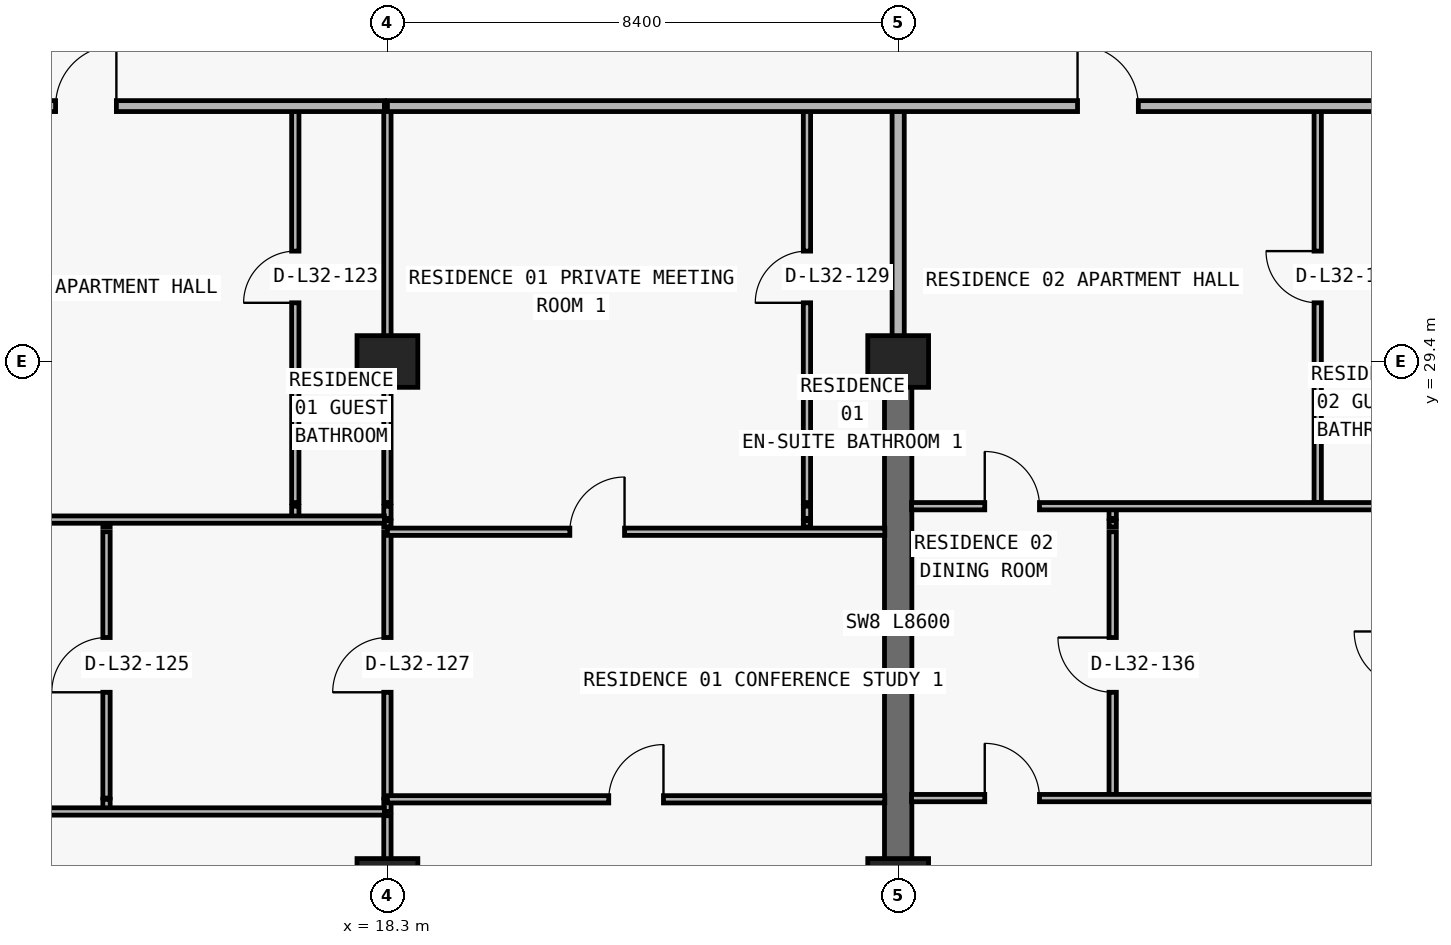
"""IFC4 building model, lengths in metres.
Left out: names, types, materials, properties, quantities, classifications, styles, units other than length and angle.
Written with IfcOpenShell. Run it as: python <this file> out.ifc"""

import sys

from ifc_helpers import new_model, si_unit, direction, frame, frame_2d, origin, origin_2d, place, context, subcontext, project, spatial, rectangle, extrude, element, fill, save


model = new_model("IFC4")
c1 = context("Model", 3, precision=1e-05, world=origin(), true_north=direction((0.0, 1.0)))
c2 = subcontext(c1, "Body", "Model", "MODEL_VIEW")
j1 = project(units=[si_unit("LENGTHUNIT", "METRE"), si_unit("PLANEANGLEUNIT", "RADIAN")], contexts=[c1])
p1 = place(None, origin())
s1 = spatial("IfcSite", under=j1, at=p1, CompositionType="ELEMENT")
p2 = place(p1, origin())
s2 = spatial("IfcBuilding", under=s1, at=p2, CompositionType="ELEMENT")
p3 = place(p2, frame((0.0, 0.0, 119.1)))
s3 = spatial("IfcBuildingStorey", under=s2, at=p3, CompositionType="ELEMENT", Elevation=119.1)
for number, where, z_axis, x_axis in (
    (1, (18.3, 20.8, 0.0), (0.0, 0.0, 1.0), (1.0, 0.0, 0.0)),
    (2, (26.7, 20.8, 0.0), (0.0, 0.0, 1.0), (1.0, 0.0, 0.0)),
    (3, (18.3, 29.4, 0.0), (0.0, 0.0, 1.0), (1.0, 0.0, 0.0)),
    (4, (26.7, 29.4, 0.0), (0.0, 0.0, 1.0), (1.0, 0.0, 0.0)),
):
    element("IfcColumn", number, at=place(p3, frame(where, z_axis=z_axis, x_axis=x_axis)), inside=s3, PredefinedType="COLUMN", context=c2, shape_type="SweptSolid", body=[
        extrude(rectangle(XDim=1.0, YDim=0.85, at=origin_2d()), origin(), (0.0, 0.0, 1.0), 3.05),
    ])
p4 = place(p3, frame((26.7, 20.8, 0.0), z_axis=(0.0, 0.0, 1.0), x_axis=(0.0, 1.0, 0.0)))
e5 = element("IfcWall", 5, at=p4, inside=s3, PredefinedType="SHEAR", context=c2, shape_type="SweptSolid", body=[
    extrude(rectangle(XDim=8.6, YDim=0.45, at=frame_2d((4.3, 0.0))), origin(), (0.0, 0.0, 1.0), 3.05),
])
p5 = place(p3, frame((13.68, 22.0, 0.0), z_axis=(0.0, 0.0, 1.0), x_axis=(0.0, 1.0, 0.0)))
e6 = element("IfcWall", 6, at=p5, inside=s3, PredefinedType="PARTITIONING", context=c2, shape_type="SweptSolid", body=[
    extrude(rectangle(XDim=0.2, YDim=0.12, at=frame_2d((0.1, 0.0))), origin(), (0.0, 0.0, 1.0), 3.05),
])
p6 = place(p3, frame((13.68, 22.22, 0.0), z_axis=(0.0, 0.0, 1.0), x_axis=(0.0, 1.0, 0.0)))
e7 = element("IfcWall", 7, at=p6, inside=s3, PredefinedType="PARTITIONING", context=c2, shape_type="SweptSolid", body=[
    extrude(rectangle(XDim=4.38, YDim=0.12, at=frame_2d((2.19, 0.0))), origin(), (0.0, 0.0, 1.0), 3.05),
])
p7 = place(p6, frame((1.74, 0.0, 0.0)))
e8 = element("IfcOpeningElement", 8, at=p7, cuts=e7, PredefinedType="OPENING", context=c2, shape_type="SweptSolid", body=[
    extrude(rectangle(XDim=0.9, YDim=2.15, at=frame_2d((0.45, 1.075))), frame((0.0, 0.07, 0.0), z_axis=(0.0, -1.0, 0.0), x_axis=(1.0, 0.0, 0.0)), (0.0, 0.0, 1.0), 0.14),
])
p8 = place(p3, frame((13.68, 26.68, 0.0), z_axis=(0.0, 0.0, 1.0), x_axis=(0.0, 1.0, 0.0)))
e9 = element("IfcWall", 9, at=p8, inside=s3, PredefinedType="PARTITIONING", context=c2, shape_type="SweptSolid", body=[
    extrude(rectangle(XDim=0.1, YDim=0.12, at=frame_2d((0.05, 0.0))), origin(), (0.0, 0.0, 1.0), 3.05),
])
p9 = place(p3, frame((16.785, 26.82, 0.0), z_axis=(0.0, 0.0, 1.0), x_axis=(0.0, 1.0, 0.0)))
e10 = element("IfcWall", 10, at=p9, inside=s3, PredefinedType="PARTITIONING", context=c2, shape_type="SweptSolid", body=[
    extrude(rectangle(XDim=0.2, YDim=0.12, at=frame_2d((0.1, 0.0))), origin(), (0.0, 0.0, 1.0), 3.05),
])
p10 = place(p3, frame((16.785, 27.08, 0.0), z_axis=(0.0, 0.0, 1.0), x_axis=(0.0, 1.0, 0.0)))
e11 = element("IfcWall", 11, at=p10, inside=s3, PredefinedType="PARTITIONING", context=c2, shape_type="SweptSolid", body=[
    extrude(rectangle(XDim=6.52, YDim=0.12, at=frame_2d((3.26, 0.0))), origin(), (0.0, 0.0, 1.0), 3.05),
])
p11 = place(p10, frame((3.285, 0.0, 0.0)))
e12 = element("IfcOpeningElement", 12, at=p11, cuts=e11, PredefinedType="OPENING", context=c2, shape_type="SweptSolid", body=[
    extrude(rectangle(XDim=0.85, YDim=2.1, at=frame_2d((0.425, 1.05))), frame((0.0, 0.07, 0.0), z_axis=(0.0, -1.0, 0.0), x_axis=(1.0, 0.0, 0.0)), (0.0, 0.0, 1.0), 0.14),
])
p12 = place(p3, frame((18.3, 8.84, 0.0), z_axis=(0.0, 0.0, 1.0), x_axis=(0.0, 1.0, 0.0)))
e13 = element("IfcWall", 13, at=p12, inside=s3, PredefinedType="PARTITIONING", context=c2, shape_type="SweptSolid", body=[
    extrude(rectangle(XDim=13.09, YDim=0.12, at=frame_2d((6.545, 0.0))), origin(), (0.0, 0.0, 1.0), 2.174),
])
p13 = place(p3, frame((18.3, 22.0, 0.0), z_axis=(0.0, 0.0, 1.0), x_axis=(0.0, 1.0, 0.0)))
e14 = element("IfcWall", 14, at=p13, inside=s3, PredefinedType="PARTITIONING", context=c2, shape_type="SweptSolid", body=[
    extrude(rectangle(XDim=0.2, YDim=0.12, at=frame_2d((0.1, 0.0))), origin(), (0.0, 0.0, 1.0), 2.174),
])
p14 = place(p3, frame((18.3, 22.22, 0.0), z_axis=(0.0, 0.0, 1.0), x_axis=(0.0, 1.0, 0.0)))
e15 = element("IfcWall", 15, at=p14, inside=s3, PredefinedType="PARTITIONING", context=c2, shape_type="SweptSolid", body=[
    extrude(rectangle(XDim=4.38, YDim=0.12, at=frame_2d((2.19, 0.0))), origin(), (0.0, 0.0, 1.0), 2.174),
])
p15 = place(p14, frame((1.74, 0.0, 0.0)))
e16 = element("IfcOpeningElement", 16, at=p15, cuts=e15, PredefinedType="OPENING", context=c2, shape_type="SweptSolid", body=[
    extrude(rectangle(XDim=0.9, YDim=2.124, at=frame_2d((0.45, 1.062))), frame((0.0, 0.07, 0.0), z_axis=(0.0, -1.0, 0.0), x_axis=(1.0, 0.0, 0.0)), (0.0, 0.0, 1.0), 0.14),
])
p16 = place(p3, frame((18.3, 26.68, 0.0), z_axis=(0.0, 0.0, 1.0), x_axis=(0.0, 1.0, 0.0)))
e17 = element("IfcWall", 17, at=p16, inside=s3, PredefinedType="PARTITIONING", context=c2, shape_type="SweptSolid", body=[
    extrude(rectangle(XDim=0.1, YDim=0.12, at=frame_2d((0.05, 0.0))), origin(), (0.0, 0.0, 1.0), 2.174),
])
p17 = place(p3, frame((18.3, 26.82, 0.0), z_axis=(0.0, 0.0, 1.0), x_axis=(0.0, 1.0, 0.0)))
e18 = element("IfcWall", 18, at=p17, inside=s3, PredefinedType="PARTITIONING", context=c2, shape_type="SweptSolid", body=[
    extrude(rectangle(XDim=0.2, YDim=0.12, at=frame_2d((0.1, 0.0))), origin(), (0.0, 0.0, 1.0), 2.174),
])
p18 = place(p3, frame((18.3, 27.08, 0.0), z_axis=(0.0, 0.0, 1.0), x_axis=(0.0, 1.0, 0.0)))
e19 = element("IfcWall", 19, at=p18, inside=s3, PredefinedType="PARTITIONING", context=c2, shape_type="SweptSolid", body=[
    extrude(rectangle(XDim=6.52, YDim=0.12, at=frame_2d((3.26, 0.0))), origin(), (0.0, 0.0, 1.0), 2.174),
])
p19 = place(p3, frame((25.2, 26.68, 0.0), z_axis=(0.0, 0.0, 1.0), x_axis=(0.0, 1.0, 0.0)))
e20 = element("IfcWall", 20, at=p19, inside=s3, PredefinedType="PARTITIONING", context=c2, shape_type="SweptSolid", body=[
    extrude(rectangle(XDim=0.1, YDim=0.12, at=frame_2d((0.05, 0.0))), origin(), (0.0, 0.0, 1.0), 3.05),
])
p20 = place(p3, frame((25.2, 26.82, 0.0), z_axis=(0.0, 0.0, 1.0), x_axis=(0.0, 1.0, 0.0)))
e21 = element("IfcWall", 21, at=p20, inside=s3, PredefinedType="PARTITIONING", context=c2, shape_type="SweptSolid", body=[
    extrude(rectangle(XDim=0.2, YDim=0.12, at=frame_2d((0.1, 0.0))), origin(), (0.0, 0.0, 1.0), 3.05),
])
p21 = place(p3, frame((25.2, 27.08, 0.0), z_axis=(0.0, 0.0, 1.0), x_axis=(0.0, 1.0, 0.0)))
e22 = element("IfcWall", 22, at=p21, inside=s3, PredefinedType="PARTITIONING", context=c2, shape_type="SweptSolid", body=[
    extrude(rectangle(XDim=6.52, YDim=0.12, at=frame_2d((3.26, 0.0))), origin(), (0.0, 0.0, 1.0), 3.05),
])
p22 = place(p21, frame((3.285, 0.0, 0.0)))
e23 = element("IfcOpeningElement", 23, at=p22, cuts=e22, PredefinedType="OPENING", context=c2, shape_type="SweptSolid", body=[
    extrude(rectangle(XDim=0.85, YDim=2.1, at=frame_2d((0.425, 1.05))), frame((0.0, 0.07, 0.0), z_axis=(0.0, -1.0, 0.0), x_axis=(1.0, 0.0, 0.0)), (0.0, 0.0, 1.0), 0.14),
])
p23 = place(p3, frame((26.7, 29.405, 0.0), z_axis=(0.0, 0.0, 1.0), x_axis=(0.0, 1.0, 0.0)))
e24 = element("IfcWall", 24, at=p23, inside=s3, PredefinedType="PARTITIONING", context=c2, shape_type="SweptSolid", body=[
    extrude(rectangle(XDim=4.195, YDim=0.2, at=frame_2d((2.098, 0.0))), origin(), (0.0, 0.0, 1.0), 2.335),
])
p24 = place(p3, frame((30.228, 22.22, 0.0), z_axis=(0.0, 0.0, 1.0), x_axis=(0.0, 1.0, 0.0)))
e25 = element("IfcWall", 25, at=p24, inside=s3, PredefinedType="PARTITIONING", context=c2, shape_type="SweptSolid", body=[
    extrude(rectangle(XDim=4.38, YDim=0.12, at=frame_2d((2.19, 0.0))), origin(), (0.0, 0.0, 1.0), 3.05),
])
p25 = place(p24, frame((1.74, 0.0, 0.0)))
e26 = element("IfcOpeningElement", 26, at=p25, cuts=e25, PredefinedType="OPENING", context=c2, shape_type="SweptSolid", body=[
    extrude(rectangle(XDim=0.9, YDim=2.15, at=frame_2d((0.45, 1.075))), frame((0.0, 0.07, 0.0), z_axis=(0.0, -1.0, 0.0), x_axis=(1.0, 0.0, 0.0)), (0.0, 0.0, 1.0), 0.14),
])
p26 = place(p3, frame((30.228, 26.68, 0.0), z_axis=(0.0, 0.0, 1.0), x_axis=(0.0, 1.0, 0.0)))
e27 = element("IfcWall", 27, at=p26, inside=s3, PredefinedType="PARTITIONING", context=c2, shape_type="SweptSolid", body=[
    extrude(rectangle(XDim=0.1, YDim=0.12, at=frame_2d((0.05, 0.0))), origin(), (0.0, 0.0, 1.0), 3.05),
])
p27 = place(p3, frame((30.228, 26.82, 0.0), z_axis=(0.0, 0.0, 1.0), x_axis=(0.0, 1.0, 0.0)))
e28 = element("IfcWall", 28, at=p27, inside=s3, PredefinedType="PARTITIONING", context=c2, shape_type="SweptSolid", body=[
    extrude(rectangle(XDim=0.2, YDim=0.12, at=frame_2d((0.1, 0.0))), origin(), (0.0, 0.0, 1.0), 3.05),
])
p28 = place(p3, frame((33.6, 27.08, 0.0), z_axis=(0.0, 0.0, 1.0), x_axis=(0.0, 1.0, 0.0)))
e29 = element("IfcWall", 29, at=p28, inside=s3, PredefinedType="PARTITIONING", context=c2, shape_type="SweptSolid", body=[
    extrude(rectangle(XDim=6.52, YDim=0.12, at=frame_2d((3.26, 0.0))), origin(), (0.0, 0.0, 1.0), 3.05),
])
p29 = place(p28, frame((3.285, 0.0, 0.0)))
e30 = element("IfcOpeningElement", 30, at=p29, cuts=e29, PredefinedType="OPENING", context=c2, shape_type="SweptSolid", body=[
    extrude(rectangle(XDim=0.85, YDim=2.1, at=frame_2d((0.425, 1.05))), frame((0.0, 0.07, 0.0), z_axis=(0.0, -1.0, 0.0), x_axis=(1.0, 0.0, 0.0)), (0.0, 0.0, 1.0), 0.14),
])
p30 = place(p3, frame((9.9, 22.0, 0.0), z_axis=(0.0, 0.0, 1.0), x_axis=(1.0, 0.0, 0.0)))
e31 = element("IfcWall", 31, at=p30, inside=s3, PredefinedType="PARTITIONING", context=c2, shape_type="SweptSolid", body=[
    extrude(rectangle(XDim=8.35, YDim=0.12, at=frame_2d((4.175, 0.0))), origin(), (0.0, 0.0, 1.0), 3.05),
])
p31 = place(p30, frame((1.44, 0.0, 0.0)))
e32 = element("IfcOpeningElement", 32, at=p31, cuts=e31, PredefinedType="OPENING", context=c2, shape_type="SweptSolid", body=[
    extrude(rectangle(XDim=0.9, YDim=2.15, at=frame_2d((0.45, 1.075))), frame((0.0, 0.07, 0.0), z_axis=(0.0, -1.0, 0.0), x_axis=(1.0, 0.0, 0.0)), (0.0, 0.0, 1.0), 0.14),
])
p32 = place(p3, frame((18.3, 22.2, 0.0), z_axis=(0.0, 0.0, 1.0), x_axis=(1.0, 0.0, 0.0)))
e33 = element("IfcWall", 33, at=p32, inside=s3, PredefinedType="PARTITIONING", context=c2, shape_type="SweptSolid", body=[
    extrude(rectangle(XDim=8.18, YDim=0.12, at=frame_2d((4.09, 0.0))), origin(), (0.0, 0.0, 1.0), 3.05),
])
p33 = place(p32, frame((3.64, 0.0, 0.0)))
e34 = element("IfcOpeningElement", 34, at=p33, cuts=e33, PredefinedType="OPENING", context=c2, shape_type="SweptSolid", body=[
    extrude(rectangle(XDim=0.9, YDim=2.15, at=frame_2d((0.45, 1.075))), frame((0.0, 0.07, 0.0), z_axis=(0.0, -1.0, 0.0), x_axis=(1.0, 0.0, 0.0)), (0.0, 0.0, 1.0), 0.14),
])
p34 = place(p3, frame((26.92, 22.22, 0.0), z_axis=(0.0, 0.0, 1.0), x_axis=(1.0, 0.0, 0.0)))
e35 = element("IfcWall", 35, at=p34, inside=s3, PredefinedType="PARTITIONING", context=c2, shape_type="SweptSolid", body=[
    extrude(rectangle(XDim=8.18, YDim=0.12, at=frame_2d((4.09, 0.0))), origin(), (0.0, 0.0, 1.0), 3.05),
])
p35 = place(p34, frame((1.204, 0.0, 0.0)))
e36 = element("IfcOpeningElement", 36, at=p35, cuts=e35, PredefinedType="OPENING", context=c2, shape_type="SweptSolid", body=[
    extrude(rectangle(XDim=0.9, YDim=2.15, at=frame_2d((0.45, 1.075))), frame((0.0, 0.07, 0.0), z_axis=(0.0, -1.0, 0.0), x_axis=(1.0, 0.0, 0.0)), (0.0, 0.0, 1.0), 0.14),
])
p36 = place(p3, frame((18.3, 26.6, 0.0), z_axis=(0.0, 0.0, 1.0), x_axis=(1.0, 0.0, 0.0)))
e37 = element("IfcWall", 37, at=p36, inside=s3, PredefinedType="PARTITIONING", context=c2, shape_type="SweptSolid", body=[
    extrude(rectangle(XDim=8.18, YDim=0.12, at=frame_2d((4.09, 0.0))), origin(), (0.0, 0.0, 1.0), 3.05),
])
p37 = place(p36, frame((3.0, 0.0, 0.0)))
e38 = element("IfcOpeningElement", 38, at=p37, cuts=e37, PredefinedType="OPENING", context=c2, shape_type="SweptSolid", body=[
    extrude(rectangle(XDim=0.9, YDim=2.15, at=frame_2d((0.45, 1.075))), frame((0.0, 0.07, 0.0), z_axis=(0.0, -1.0, 0.0), x_axis=(1.0, 0.0, 0.0)), (0.0, 0.0, 1.0), 0.14),
])
p38 = place(p3, frame((9.9, 26.8, 0.0), z_axis=(0.0, 0.0, 1.0), x_axis=(1.0, 0.0, 0.0)))
e39 = element("IfcWall", 39, at=p38, inside=s3, PredefinedType="PARTITIONING", context=c2, shape_type="SweptSolid", body=[
    extrude(rectangle(XDim=8.35, YDim=0.12, at=frame_2d((4.175, 0.0))), origin(), (0.0, 0.0, 1.0), 3.05),
])
p39 = place(p38, frame((1.44, 0.0, 0.0)))
e40 = element("IfcOpeningElement", 40, at=p39, cuts=e39, PredefinedType="OPENING", context=c2, shape_type="SweptSolid", body=[
    extrude(rectangle(XDim=0.9, YDim=2.15, at=frame_2d((0.45, 1.075))), frame((0.0, 0.07, 0.0), z_axis=(0.0, -1.0, 0.0), x_axis=(1.0, 0.0, 0.0)), (0.0, 0.0, 1.0), 0.14),
])
p40 = place(p3, frame((26.92, 27.02, 0.0), z_axis=(0.0, 0.0, 1.0), x_axis=(1.0, 0.0, 0.0)))
e41 = element("IfcWall", 41, at=p40, inside=s3, PredefinedType="PARTITIONING", context=c2, shape_type="SweptSolid", body=[
    extrude(rectangle(XDim=8.175, YDim=0.12, at=frame_2d((4.087, 0.0))), origin(), (0.0, 0.0, 1.0), 3.05),
])
p41 = place(p40, frame((1.204, 0.0, 0.0)))
e42 = element("IfcOpeningElement", 42, at=p41, cuts=e41, PredefinedType="OPENING", context=c2, shape_type="SweptSolid", body=[
    extrude(rectangle(XDim=0.9, YDim=2.15, at=frame_2d((0.45, 1.075))), frame((0.0, 0.07, 0.0), z_axis=(0.0, -1.0, 0.0), x_axis=(1.0, 0.0, 0.0)), (0.0, 0.0, 1.0), 0.14),
])
p42 = place(p3, frame((7.705, 33.6, 0.0), z_axis=(0.0, 0.0, 1.0), x_axis=(1.0, 0.0, 0.0)))
e43 = element("IfcWall", 43, at=p42, inside=s3, PredefinedType="PARTITIONING", context=c2, shape_type="SweptSolid", body=[
    extrude(rectangle(XDim=10.545, YDim=0.18, at=frame_2d((5.272, 0.0))), origin(), (0.0, 0.0, 1.0), 3.05),
])
p43 = place(p42, frame((5.137, 0.0, 0.0)))
e44 = element("IfcOpeningElement", 44, at=p43, cuts=e43, PredefinedType="OPENING", context=c2, shape_type="SweptSolid", body=[
    extrude(rectangle(XDim=1.0, YDim=2.2, at=frame_2d((0.5, 1.1))), frame((0.0, 0.1, 0.0), z_axis=(0.0, -1.0, 0.0), x_axis=(1.0, 0.0, 0.0)), (0.0, 0.0, 1.0), 0.2),
])
p44 = place(p3, frame((18.3, 33.6, 0.0), z_axis=(0.0, 0.0, 1.0), x_axis=(1.0, 0.0, 0.0)))
e45 = element("IfcWall", 45, at=p44, inside=s3, PredefinedType="PARTITIONING", context=c2, shape_type="SweptSolid", body=[
    extrude(rectangle(XDim=41.2, YDim=0.18, at=frame_2d((20.6, 0.0))), origin(), (0.0, 0.0, 1.0), 3.05),
])
p45 = place(p44, frame((11.35, 0.0, 0.0)))
e46 = element("IfcOpeningElement", 46, at=p45, cuts=e45, PredefinedType="OPENING", context=c2, shape_type="SweptSolid", body=[
    extrude(rectangle(XDim=1.0, YDim=2.2, at=frame_2d((0.5, 1.1))), frame((0.0, 0.1, 0.0), z_axis=(0.0, -1.0, 0.0), x_axis=(1.0, 0.0, 0.0)), (0.0, 0.0, 1.0), 0.2),
])
p46 = place(p44, frame((27.275, 0.0, 0.0)))
e47 = element("IfcOpeningElement", 47, at=p46, cuts=e45, PredefinedType="OPENING", context=c2, shape_type="SweptSolid", body=[
    extrude(rectangle(XDim=1.0, YDim=2.2, at=frame_2d((0.5, 1.1))), frame((0.0, 0.1, 0.0), z_axis=(0.0, -1.0, 0.0), x_axis=(1.0, 0.0, 0.0)), (0.0, 0.0, 1.0), 0.2),
])
p47 = place(p44, frame((35.675, 0.0, 0.0)))
e48 = element("IfcOpeningElement", 48, at=p47, cuts=e45, PredefinedType="OPENING", context=c2, shape_type="SweptSolid", body=[
    extrude(rectangle(XDim=1.0, YDim=2.2, at=frame_2d((0.5, 1.1))), frame((0.0, 0.1, 0.0), z_axis=(0.0, -1.0, 0.0), x_axis=(1.0, 0.0, 0.0)), (0.0, 0.0, 1.0), 0.2),
])
p48 = place(p43, origin())
e49 = element("IfcDoor", 49, at=p48, inside=s3, OperationType="SINGLE_SWING_RIGHT", PredefinedType="DOOR", context=c2, shape_type="SweptSolid", body=[
    extrude(rectangle(XDim=1.0, YDim=2.2, at=frame_2d((0.5, 1.1))), frame((0.0, 0.025, 0.0), z_axis=(0.0, -1.0, 0.0), x_axis=(1.0, 0.0, 0.0)), (0.0, 0.0, 1.0), 0.05),
])
fill(e44, e49)
p49 = place(p11, origin())
e50 = element("IfcDoor", 50, at=p49, inside=s3, OperationType="SINGLE_SWING_LEFT", PredefinedType="DOOR", context=c2, shape_type="SweptSolid", body=[
    extrude(rectangle(XDim=0.85, YDim=2.1, at=frame_2d((0.425, 1.05))), frame((0.0, 0.025, 0.0), z_axis=(0.0, -1.0, 0.0), x_axis=(1.0, 0.0, 0.0)), (0.0, 0.0, 1.0), 0.05),
])
fill(e12, e50)
p50 = place(p7, origin())
e51 = element("IfcDoor", 51, at=p50, inside=s3, OperationType="SINGLE_SWING_LEFT", PredefinedType="DOOR", context=c2, shape_type="SweptSolid", body=[
    extrude(rectangle(XDim=0.9, YDim=2.15, at=frame_2d((0.45, 1.075))), frame((0.0, 0.025, 0.0), z_axis=(0.0, -1.0, 0.0), x_axis=(1.0, 0.0, 0.0)), (0.0, 0.0, 1.0), 0.05),
])
fill(e8, e51)
p51 = place(p15, origin())
e52 = element("IfcDoor", 52, at=p51, inside=s3, OperationType="SINGLE_SWING_LEFT", PredefinedType="DOOR", context=c2, shape_type="SweptSolid", body=[
    extrude(rectangle(XDim=0.9, YDim=2.124, at=frame_2d((0.45, 1.062))), frame((0.0, 0.025, 0.0), z_axis=(0.0, -1.0, 0.0), x_axis=(1.0, 0.0, 0.0)), (0.0, 0.0, 1.0), 0.05),
])
fill(e16, e52)
p52 = place(p37, origin())
e53 = element("IfcDoor", 53, at=p52, inside=s3, OperationType="SINGLE_SWING_RIGHT", PredefinedType="DOOR", context=c2, shape_type="SweptSolid", body=[
    extrude(rectangle(XDim=0.9, YDim=2.15, at=frame_2d((0.45, 1.075))), frame((0.0, 0.025, 0.0), z_axis=(0.0, -1.0, 0.0), x_axis=(1.0, 0.0, 0.0)), (0.0, 0.0, 1.0), 0.05),
])
fill(e38, e53)
p53 = place(p22, origin())
e54 = element("IfcDoor", 54, at=p53, inside=s3, OperationType="SINGLE_SWING_LEFT", PredefinedType="DOOR", context=c2, shape_type="SweptSolid", body=[
    extrude(rectangle(XDim=0.85, YDim=2.1, at=frame_2d((0.425, 1.05))), frame((0.0, 0.025, 0.0), z_axis=(0.0, -1.0, 0.0), x_axis=(1.0, 0.0, 0.0)), (0.0, 0.0, 1.0), 0.05),
])
fill(e23, e54)
p54 = place(p33, origin())
e55 = element("IfcDoor", 55, at=p54, inside=s3, OperationType="SINGLE_SWING_RIGHT", PredefinedType="DOOR", context=c2, shape_type="SweptSolid", body=[
    extrude(rectangle(XDim=0.9, YDim=2.15, at=frame_2d((0.45, 1.075))), frame((0.0, 0.025, 0.0), z_axis=(0.0, -1.0, 0.0), x_axis=(1.0, 0.0, 0.0)), (0.0, 0.0, 1.0), 0.05),
])
fill(e34, e55)
p55 = place(p45, origin())
e56 = element("IfcDoor", 56, at=p55, inside=s3, OperationType="SINGLE_SWING_LEFT", PredefinedType="DOOR", context=c2, shape_type="SweptSolid", body=[
    extrude(rectangle(XDim=1.0, YDim=2.2, at=frame_2d((0.5, 1.1))), frame((0.0, 0.025, 0.0), z_axis=(0.0, -1.0, 0.0), x_axis=(1.0, 0.0, 0.0)), (0.0, 0.0, 1.0), 0.05),
])
fill(e46, e56)
p56 = place(p29, origin())
e57 = element("IfcDoor", 57, at=p56, inside=s3, OperationType="SINGLE_SWING_RIGHT", PredefinedType="DOOR", context=c2, shape_type="SweptSolid", body=[
    extrude(rectangle(XDim=0.85, YDim=2.1, at=frame_2d((0.425, 1.05))), frame((0.0, 0.025, 0.0), z_axis=(0.0, -1.0, 0.0), x_axis=(1.0, 0.0, 0.0)), (0.0, 0.0, 1.0), 0.05),
])
fill(e30, e57)
p57 = place(p41, origin())
e58 = element("IfcDoor", 58, at=p57, inside=s3, OperationType="SINGLE_SWING_LEFT", PredefinedType="DOOR", context=c2, shape_type="SweptSolid", body=[
    extrude(rectangle(XDim=0.9, YDim=2.15, at=frame_2d((0.45, 1.075))), frame((0.0, 0.025, 0.0), z_axis=(0.0, -1.0, 0.0), x_axis=(1.0, 0.0, 0.0)), (0.0, 0.0, 1.0), 0.05),
])
fill(e42, e58)
p58 = place(p25, origin())
e59 = element("IfcDoor", 59, at=p58, inside=s3, OperationType="SINGLE_SWING_RIGHT", PredefinedType="DOOR", context=c2, shape_type="SweptSolid", body=[
    extrude(rectangle(XDim=0.9, YDim=2.15, at=frame_2d((0.45, 1.075))), frame((0.0, 0.025, 0.0), z_axis=(0.0, -1.0, 0.0), x_axis=(1.0, 0.0, 0.0)), (0.0, 0.0, 1.0), 0.05),
])
fill(e26, e59)
p59 = place(p35, origin())
e60 = element("IfcDoor", 60, at=p59, inside=s3, OperationType="SINGLE_SWING_LEFT", PredefinedType="DOOR", context=c2, shape_type="SweptSolid", body=[
    extrude(rectangle(XDim=0.9, YDim=2.15, at=frame_2d((0.45, 1.075))), frame((0.0, 0.025, 0.0), z_axis=(0.0, -1.0, 0.0), x_axis=(1.0, 0.0, 0.0)), (0.0, 0.0, 1.0), 0.05),
])
fill(e36, e60)
save(model, sys.argv[1])
